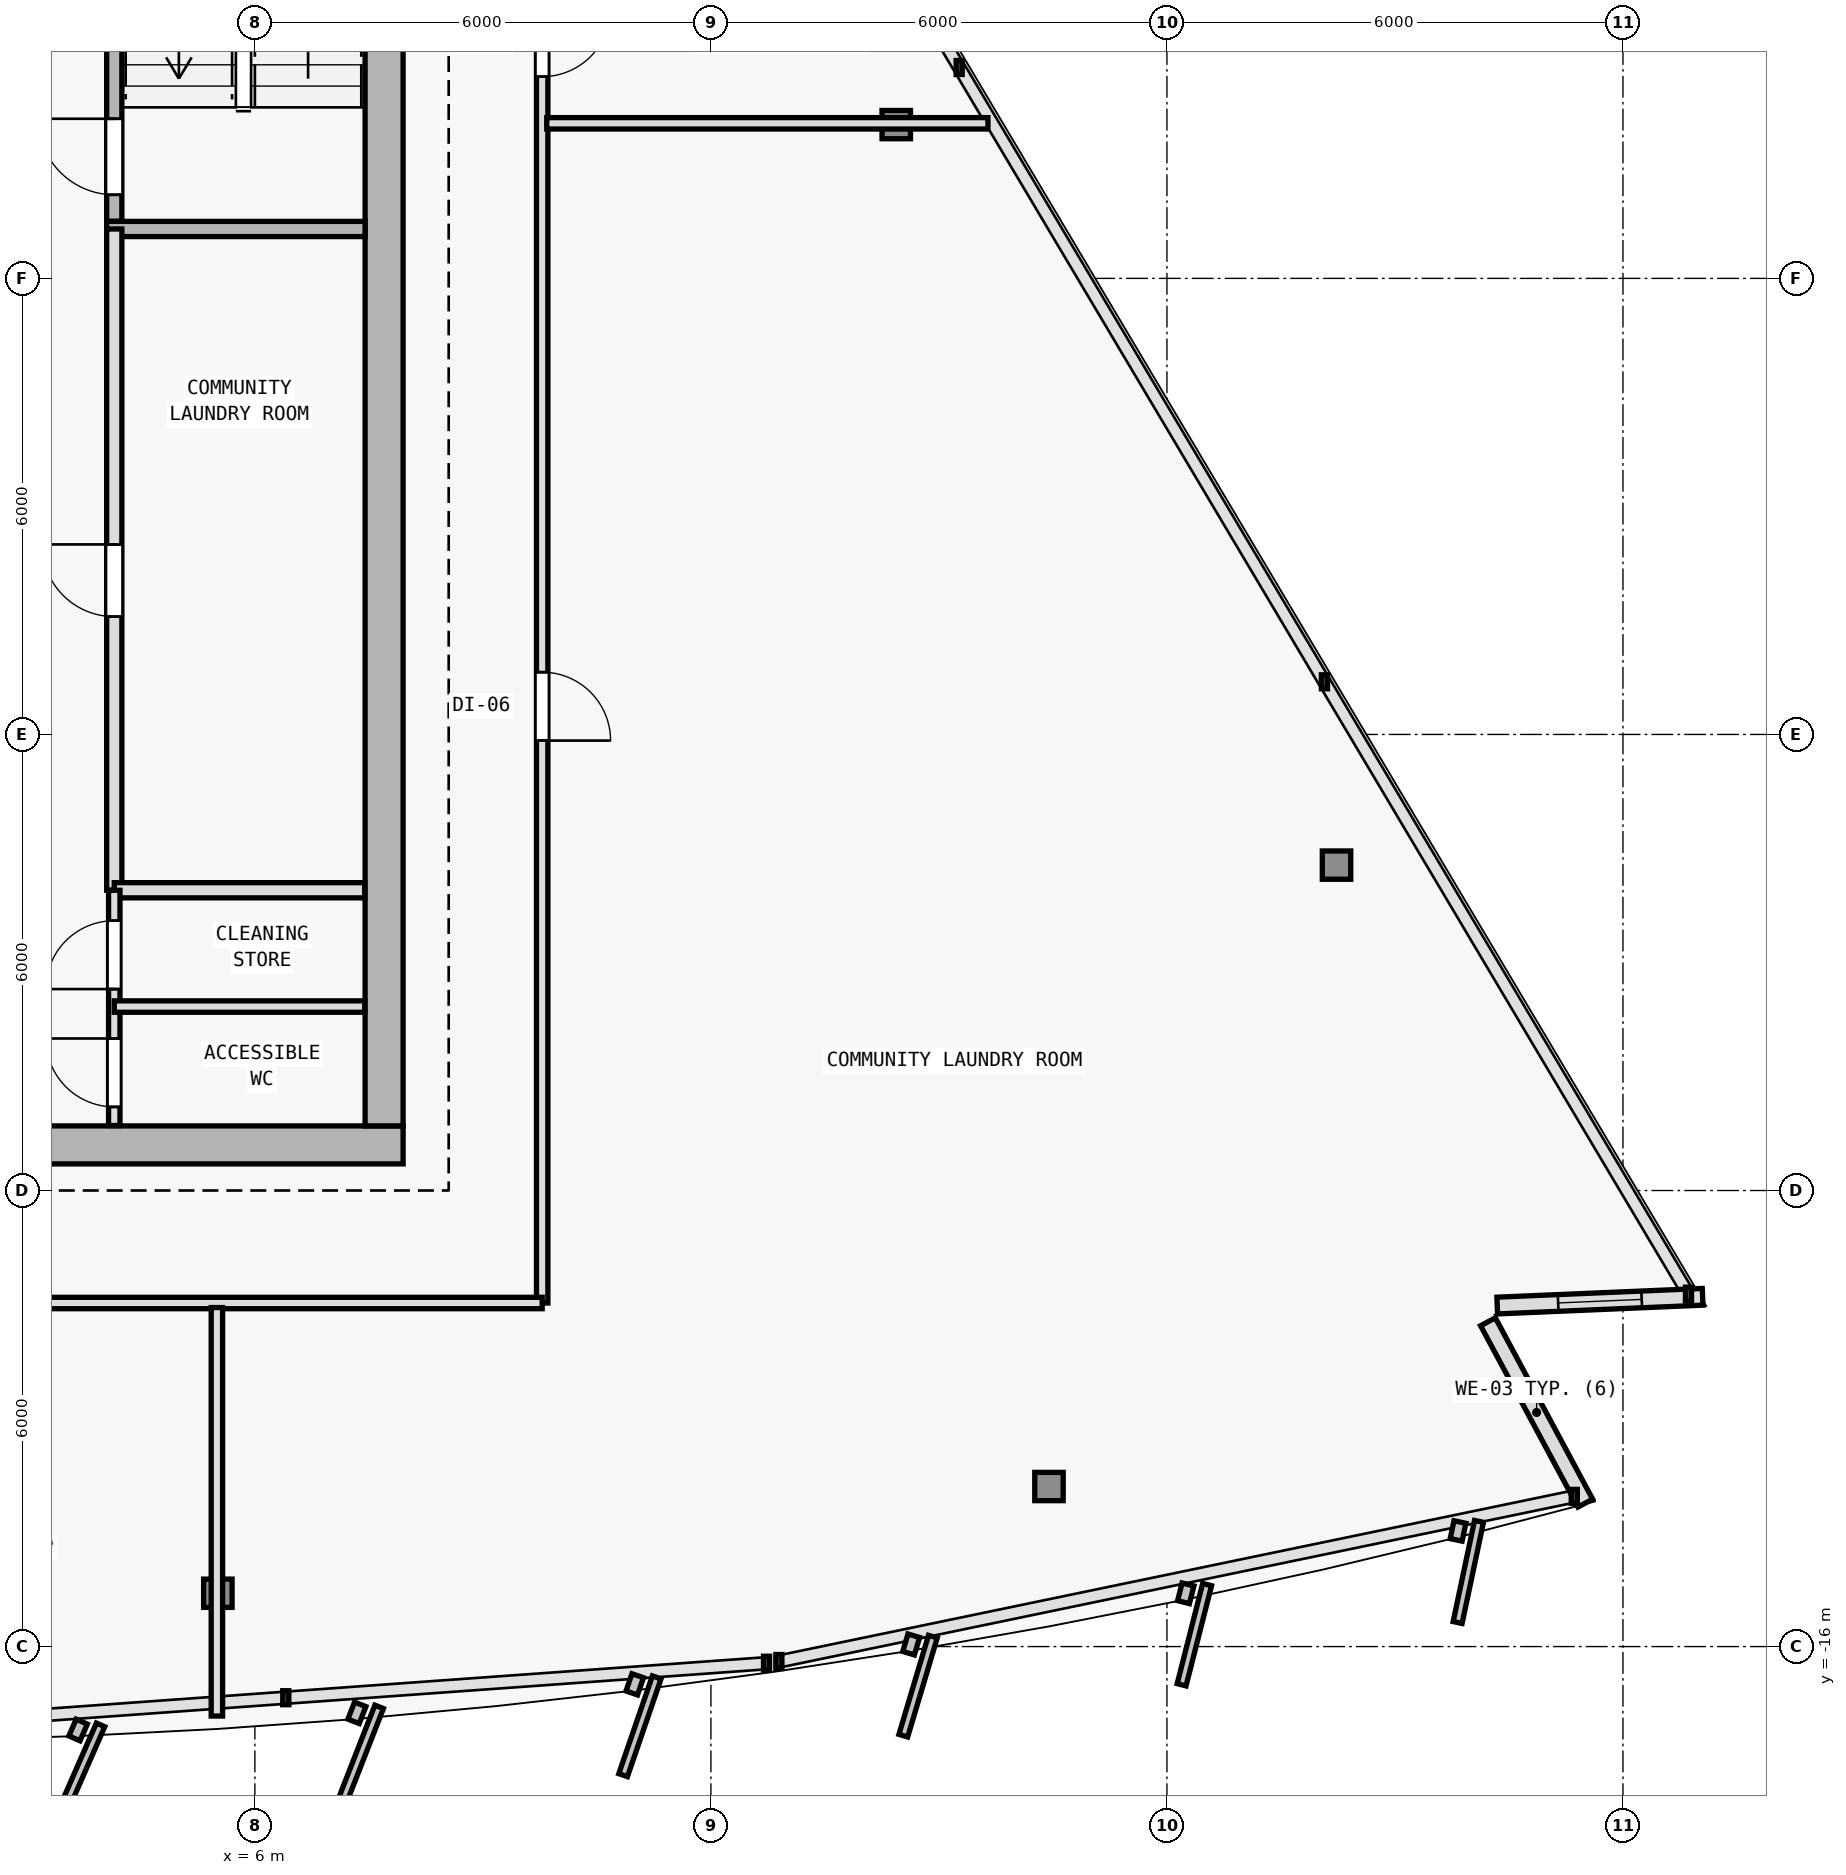
"""IFC4 building model, lengths in metres.
Left out: names, types, materials, properties, quantities, classifications, styles, units other than length and angle.
Written with IfcOpenShell. Run it as: python <this file> out.ifc"""

import sys

from ifc_helpers import new_model, si_unit, direction, frame, frame_2d, origin, origin_2d, place, context, subcontext, project, spatial, rectangle, i_section, extrude, element, fill, save


model = new_model("IFC4")
c1 = context("Model", 3, precision=1e-05, world=origin(), true_north=direction((0.0, 1.0)))
c2 = subcontext(c1, "Body", "Model", "MODEL_VIEW")
j1 = project(units=[si_unit("LENGTHUNIT", "METRE"), si_unit("PLANEANGLEUNIT", "RADIAN")], contexts=[c1])
p1 = place(None, origin())
s1 = spatial("IfcSite", under=j1, at=p1, CompositionType="ELEMENT")
p2 = place(p1, origin())
s2 = spatial("IfcBuilding", under=s1, at=p2, CompositionType="ELEMENT")
p3 = place(p2, frame((0.0, 0.0, 223.5)))
s3 = spatial("IfcBuildingStorey", under=s2, at=p3, CompositionType="ELEMENT", Elevation=223.5)
for number, where, z_axis, x_axis in (
    (1, (7.7, -9.4, 0.0), (0.0, 0.0, 1.0), (1.0, 0.0, 0.0)),
    (2, (7.7, 0.4, 0.0), (0.0, 0.0, 1.0), (1.0, 0.0, 0.0)),
):
    element("IfcColumn", number, at=place(p3, frame(where, z_axis=z_axis, x_axis=x_axis)), inside=s3, PredefinedType="COLUMN", context=c2, shape_type="SweptSolid", body=[
        extrude(i_section(OverallWidth=0.398, OverallDepth=0.387, WebThickness=0.013, FlangeThickness=0.022, FilletRadius=0.015, at=origin_2d()), origin(), (0.0, 0.0, 1.0), 3.6),
    ])
p4 = place(p3, frame((5.513, -15.298, 0.006), z_axis=(-0.006934304776, 0.03521539092, 0.999355688261), x_axis=(-0.981159154887, -0.193201223549, 0.0)))
e3 = element("IfcColumn", 3, at=p4, inside=s3, PredefinedType="COLUMN", context=c2, shape_type="SweptSolid", body=[
    extrude(i_section(OverallWidth=0.374, OverallDepth=0.372, WebThickness=0.012, FlangeThickness=0.02, FilletRadius=0.015, at=origin_2d()), origin(), (0.0, 0.0, 1.0), 3.591),
])
p5 = place(p3, frame((16.448, -13.894, 0.006), z_axis=(-0.020664285442, 0.033443514597, 0.999226960524), x_axis=(-0.850707037426, -0.525640120686, 0.0)))
e4 = element("IfcColumn", 4, at=p5, inside=s3, PredefinedType="COLUMN", context=c2, shape_type="SweptSolid", body=[
    extrude(i_section(OverallWidth=0.374, OverallDepth=0.372, WebThickness=0.012, FlangeThickness=0.02, FilletRadius=0.015, at=origin_2d()), origin(), (0.0, 0.0, 1.0), 3.592),
])
p6 = place(p3, frame((20.231, -5.719, 0.006), z_axis=(-0.026039494941, 0.021620259507, 0.999427090428), x_axis=(-0.638800249892, -0.769372628015, 0.0)))
e5 = element("IfcColumn", 5, at=p6, inside=s3, PredefinedType="COLUMN", context=c2, shape_type="SweptSolid", body=[
    extrude(i_section(OverallWidth=0.374, OverallDepth=0.372, WebThickness=0.012, FlangeThickness=0.02, FilletRadius=0.015, at=origin_2d()), origin(), (0.0, 0.0, 1.0), 3.591),
])
p7 = place(p3, frame((14.438, 4.023, 0.006), z_axis=(-0.018907326549, 0.00952167524, 0.999775900241), x_axis=(-0.449781931574, -0.893138406984, 0.0)))
e6 = element("IfcColumn", 6, at=p7, inside=s3, PredefinedType="COLUMN", context=c2, shape_type="SweptSolid", body=[
    extrude(i_section(OverallWidth=0.374, OverallDepth=0.372, WebThickness=0.012, FlangeThickness=0.02, FilletRadius=0.015, at=origin_2d()), origin(), (0.0, 0.0, 1.0), 3.59),
])
p8 = place(p3, frame((22.224, -11.727, 0.0), z_axis=(0.0, 0.0, 1.0), x_axis=(0.47278184311, -0.881179509989, 0.0)))
e7 = element("IfcWall", 7, at=p8, inside=s3, PredefinedType="SOLIDWALL", context=c2, shape_type="SweptSolid", body=[
    extrude(rectangle(XDim=2.708, YDim=0.22, at=frame_2d((1.354, 0.0))), origin(), (0.0, 0.0, 1.0), 3.35),
])
p9 = place(p3, frame((25.048, -11.398, 0.0), z_axis=(0.0, 0.0, 1.0), x_axis=(-0.999095922254, -0.042512799655, 0.0)))
e8 = element("IfcWall", 8, at=p9, inside=s3, PredefinedType="SOLIDWALL", context=c2, shape_type="SweptSolid", body=[
    extrude(rectangle(XDim=2.705, YDim=0.22, at=frame_2d((1.353, 0.0))), origin(), (0.0, 0.0, 1.0), 3.35),
])
p10 = place(p9, frame((0.802, 0.0, 0.62)))
e9 = element("IfcOpeningElement", 9, at=p10, cuts=e8, PredefinedType="OPENING", context=c2, shape_type="SweptSolid", body=[
    extrude(rectangle(XDim=1.1, YDim=1.8, at=frame_2d((0.55, 0.9))), frame((0.0, 0.12, 0.0), z_axis=(0.0, -1.0, 0.0), x_axis=(1.0, 0.0, 0.0)), (0.0, 0.0, 1.0), 0.24),
])
p11 = place(p3, frame((-7.95, -9.4, 0.0), z_axis=(0.0, 0.0, 1.0), x_axis=(1.0, 0.0, 0.0)))
e10 = element("IfcWall", 10, at=p11, inside=s3, PredefinedType="SHEAR", context=c2, shape_type="SweptSolid", body=[
    extrude(rectangle(XDim=15.9, YDim=0.5, at=frame_2d((7.95, 0.0))), origin(), (0.0, 0.0, 1.0), 3.35),
])
p12 = place(p11, frame((9.6, 0.0, 0.0)))
e11 = element("IfcOpeningElement", 11, at=p12, cuts=e10, PredefinedType="OPENING", context=c2, shape_type="SweptSolid", body=[
    extrude(rectangle(XDim=1.5, YDim=2.2, at=frame_2d((0.75, 1.1))), frame((0.0, 0.26, 0.0), z_axis=(0.0, -1.0, 0.0), x_axis=(1.0, 0.0, 0.0)), (0.0, 0.0, 1.0), 0.52),
])
p13 = place(p3, frame((7.7, 9.95, 0.0), z_axis=(0.0, 0.0, 1.0), x_axis=(0.0, -1.0, 0.0)))
e12 = element("IfcWall", 12, at=p13, inside=s3, PredefinedType="SHEAR", context=c2, shape_type="SweptSolid", body=[
    extrude(rectangle(XDim=19.1, YDim=0.5, at=frame_2d((9.55, 0.0))), origin(), (0.0, 0.0, 1.0), 3.35),
])
p14 = place(p3, frame((4.15, 2.75, 0.0), z_axis=(0.0, 0.0, 1.0), x_axis=(0.0, 1.0, 0.0)))
e13 = element("IfcWall", 13, at=p14, inside=s3, PredefinedType="SOLIDWALL", context=c2, shape_type="SweptSolid", body=[
    extrude(rectangle(XDim=7.2, YDim=0.2, at=frame_2d((3.6, 0.0))), origin(), (0.0, 0.0, 1.0), 3.35),
])
p15 = place(p14, frame((0.35, 0.0, 0.0)))
e14 = element("IfcOpeningElement", 14, at=p15, cuts=e13, PredefinedType="OPENING", context=c2, shape_type="SweptSolid", body=[
    extrude(rectangle(XDim=1.0, YDim=2.15, at=frame_2d((0.5, 1.075))), frame((0.0, 0.11, 0.0), z_axis=(0.0, -1.0, 0.0), x_axis=(1.0, 0.0, 0.0)), (0.0, 0.0, 1.0), 0.22),
])
p16 = place(p3, frame((4.05, 2.65, 0.0), z_axis=(0.0, 0.0, 1.0), x_axis=(1.0, 0.0, 0.0)))
e15 = element("IfcWall", 15, at=p16, inside=s3, PredefinedType="SOLIDWALL", context=c2, shape_type="SweptSolid", body=[
    extrude(rectangle(XDim=3.4, YDim=0.2, at=frame_2d((1.7, 0.0))), origin(), (0.0, 0.0, 1.0), 3.35),
])
p17 = place(p3, frame((4.15, -6.05, 0.0), z_axis=(0.0, 0.0, 1.0), x_axis=(0.0, 1.0, 0.0)))
e16 = element("IfcWall", 16, at=p17, inside=s3, PredefinedType="SOLIDWALL", context=c2, shape_type="SweptSolid", body=[
    extrude(rectangle(XDim=8.7, YDim=0.2, at=frame_2d((4.35, 0.0))), origin(), (0.0, 0.0, 1.0), 3.35),
])
p18 = place(p17, frame((3.6, 0.0, 0.0)))
e17 = element("IfcOpeningElement", 17, at=p18, cuts=e16, PredefinedType="OPENING", context=c2, shape_type="SweptSolid", body=[
    extrude(rectangle(XDim=0.95, YDim=2.1, at=frame_2d((0.475, 1.05))), frame((0.0, 0.11, 0.0), z_axis=(0.0, -1.0, 0.0), x_axis=(1.0, 0.0, 0.0)), (0.0, 0.0, 1.0), 0.22),
])
p19 = place(p3, frame((4.15, -6.05, 0.0), z_axis=(0.0, 0.0, 1.0), x_axis=(1.0, 0.0, 0.0)))
e18 = element("IfcWall", 18, at=p19, inside=s3, PredefinedType="SOLIDWALL", context=c2, shape_type="SweptSolid", body=[
    extrude(rectangle(XDim=3.295, YDim=0.2, at=frame_2d((1.647, 0.0))), origin(), (0.0, 0.0, 1.0), 3.35),
])
p20 = place(p3, frame((4.15, -9.145, 0.0), z_axis=(0.0, 0.0, 1.0), x_axis=(0.0, 1.0, 0.0)))
e19 = element("IfcWall", 19, at=p20, inside=s3, PredefinedType="PARTITIONING", context=c2, shape_type="SweptSolid", body=[
    extrude(rectangle(XDim=3.095, YDim=0.15, at=frame_2d((1.547, 0.0))), origin(), (0.0, 0.0, 1.0), 3.35),
])
p21 = place(p20, frame((0.245, 0.0, 0.0)))
e20 = element("IfcOpeningElement", 20, at=p21, cuts=e19, PredefinedType="OPENING", context=c2, shape_type="SweptSolid", body=[
    extrude(rectangle(XDim=0.9, YDim=2.1, at=frame_2d((0.45, 1.05))), frame((0.0, 0.085, 0.0), z_axis=(0.0, -1.0, 0.0), x_axis=(1.0, 0.0, 0.0)), (0.0, 0.0, 1.0), 0.17),
])
p22 = place(p20, frame((1.795, 0.0, 0.0)))
e21 = element("IfcOpeningElement", 21, at=p22, cuts=e19, PredefinedType="OPENING", context=c2, shape_type="SweptSolid", body=[
    extrude(rectangle(XDim=0.9, YDim=2.1, at=frame_2d((0.45, 1.05))), frame((0.0, 0.085, 0.0), z_axis=(0.0, -1.0, 0.0), x_axis=(1.0, 0.0, 0.0)), (0.0, 0.0, 1.0), 0.17),
])
p23 = place(p3, frame((4.15, -7.58, 0.0), z_axis=(0.0, 0.0, 1.0), x_axis=(1.0, 0.0, 0.0)))
e22 = element("IfcWall", 22, at=p23, inside=s3, PredefinedType="PARTITIONING", context=c2, shape_type="SweptSolid", body=[
    extrude(rectangle(XDim=3.295, YDim=0.15, at=frame_2d((1.647, 0.0))), origin(), (0.0, 0.0, 1.0), 3.35),
])
p24 = place(p3, frame((9.78, 8.226, 0.0), z_axis=(0.0, 0.0, 1.0), x_axis=(0.0, -1.0, 0.0)))
e23 = element("IfcWall", 23, at=p24, inside=s3, PredefinedType="PARTITIONING", context=c2, shape_type="SweptSolid", body=[
    extrude(rectangle(XDim=19.706, YDim=0.15, at=frame_2d((9.853, 0.0))), origin(), (0.0, 0.0, 1.0), 2.775),
])
p25 = place(p24, frame((11.407, 0.0, 0.0)))
e24 = element("IfcOpeningElement", 24, at=p25, cuts=e23, PredefinedType="OPENING", context=c2, shape_type="SweptSolid", body=[
    extrude(rectangle(XDim=0.9, YDim=2.1, at=frame_2d((0.45, 1.05))), frame((0.0, 0.085, 0.0), z_axis=(0.0, -1.0, 0.0), x_axis=(1.0, 0.0, 0.0)), (0.0, 0.0, 1.0), 0.17),
])
p26 = place(p24, frame((2.672, 0.0, 0.0)))
e25 = element("IfcOpeningElement", 25, at=p26, cuts=e23, PredefinedType="OPENING", context=c2, shape_type="SweptSolid", body=[
    extrude(rectangle(XDim=0.9, YDim=2.1, at=frame_2d((0.45, 1.05))), frame((0.0, 0.085, 0.0), z_axis=(0.0, -1.0, 0.0), x_axis=(1.0, 0.0, 0.0)), (0.0, 0.0, 1.0), 0.17),
])
p27 = place(p24, frame((0.668, 0.0, 0.0)))
e26 = element("IfcOpeningElement", 26, at=p27, cuts=e23, PredefinedType="OPENING", context=c2, shape_type="SweptSolid", body=[
    extrude(rectangle(XDim=0.9, YDim=2.1, at=frame_2d((0.45, 1.05))), frame((0.0, 0.085, 0.0), z_axis=(0.0, -1.0, 0.0), x_axis=(1.0, 0.0, 0.0)), (0.0, 0.0, 1.0), 0.17),
])
p28 = place(p3, frame((9.78, -11.48, 0.0), z_axis=(0.0, 0.0, 1.0), x_axis=(-1.0, 0.0, 0.0)))
e27 = element("IfcWall", 27, at=p28, inside=s3, PredefinedType="PARTITIONING", context=c2, shape_type="SweptSolid", body=[
    extrude(rectangle(XDim=19.56, YDim=0.15, at=frame_2d((9.78, 0.0))), origin(), (0.0, 0.0, 1.0), 3.005),
])
p29 = place(p28, frame((12.177, 0.0, 0.0)))
e28 = element("IfcOpeningElement", 28, at=p29, cuts=e27, PredefinedType="OPENING", context=c2, shape_type="SweptSolid", body=[
    extrude(rectangle(XDim=0.9, YDim=2.1, at=frame_2d((0.45, 1.05))), frame((0.0, 0.085, 0.0), z_axis=(0.0, -1.0, 0.0), x_axis=(1.0, 0.0, 0.0)), (0.0, 0.0, 1.0), 0.17),
])
p30 = place(p28, frame((6.677, 0.0, 0.0)))
e29 = element("IfcOpeningElement", 29, at=p30, cuts=e27, PredefinedType="OPENING", context=c2, shape_type="SweptSolid", body=[
    extrude(rectangle(XDim=0.9, YDim=2.1, at=frame_2d((0.45, 1.05))), frame((0.0, 0.085, 0.0), z_axis=(0.0, -1.0, 0.0), x_axis=(1.0, 0.0, 0.0)), (0.0, 0.0, 1.0), 0.17),
])
p31 = place(p3, frame((5.5, -11.54, 0.0), z_axis=(0.0, 0.0, 1.0), x_axis=(0.0, -1.0, 0.0)))
e30 = element("IfcWall", 30, at=p31, inside=s3, PredefinedType="PARTITIONING", context=c2, shape_type="SweptSolid", body=[
    extrude(rectangle(XDim=5.374, YDim=0.15, at=frame_2d((2.687, 0.0))), origin(), (0.0, 0.0, 1.0), 2.725),
])
p32 = place(p3, frame((9.84, 4.04, 0.0), z_axis=(0.0, 0.0, 1.0), x_axis=(1.0, 0.0, 0.0)))
e31 = element("IfcWall", 31, at=p32, inside=s3, PredefinedType="PARTITIONING", context=c2, shape_type="SweptSolid", body=[
    extrude(rectangle(XDim=5.805, YDim=0.15, at=frame_2d((2.902, 0.0))), origin(), (0.0, 0.0, 1.0), 2.875),
])
p33 = place(p10, origin())
e32 = element("IfcWindow", 32, at=p33, inside=s3, PartitioningType="SINGLE_PANEL", PredefinedType="WINDOW", context=c2, shape_type="SweptSolid", body=[
    extrude(rectangle(XDim=1.1, YDim=1.8, at=frame_2d((0.55, 0.9))), frame((0.0, 0.03, 0.0), z_axis=(0.0, -1.0, 0.0), x_axis=(1.0, 0.0, 0.0)), (0.0, 0.0, 1.0), 0.06),
])
fill(e9, e32)
p34 = place(p15, origin())
e33 = element("IfcDoor", 33, at=p34, inside=s3, OperationType="SINGLE_SWING_RIGHT", PredefinedType="DOOR", context=c2, shape_type="SweptSolid", body=[
    extrude(rectangle(XDim=1.0, YDim=2.15, at=frame_2d((0.5, 1.075))), frame((0.0, 0.025, 0.0), z_axis=(0.0, -1.0, 0.0), x_axis=(1.0, 0.0, 0.0)), (0.0, 0.0, 1.0), 0.05),
])
fill(e14, e33)
p35 = place(p18, origin())
e34 = element("IfcDoor", 34, at=p35, inside=s3, OperationType="SINGLE_SWING_RIGHT", PredefinedType="DOOR", context=c2, shape_type="SweptSolid", body=[
    extrude(rectangle(XDim=0.95, YDim=2.1, at=frame_2d((0.475, 1.05))), frame((0.0, 0.025, 0.0), z_axis=(0.0, -1.0, 0.0), x_axis=(1.0, 0.0, 0.0)), (0.0, 0.0, 1.0), 0.05),
])
fill(e17, e34)
p36 = place(p21, origin())
e35 = element("IfcDoor", 35, at=p36, inside=s3, OperationType="SINGLE_SWING_RIGHT", PredefinedType="DOOR", context=c2, shape_type="SweptSolid", body=[
    extrude(rectangle(XDim=0.9, YDim=2.1, at=frame_2d((0.45, 1.05))), frame((0.0, 0.025, 0.0), z_axis=(0.0, -1.0, 0.0), x_axis=(1.0, 0.0, 0.0)), (0.0, 0.0, 1.0), 0.05),
])
fill(e20, e35)
p37 = place(p22, origin())
e36 = element("IfcDoor", 36, at=p37, inside=s3, OperationType="SINGLE_SWING_LEFT", PredefinedType="DOOR", context=c2, shape_type="SweptSolid", body=[
    extrude(rectangle(XDim=0.9, YDim=2.1, at=frame_2d((0.45, 1.05))), frame((0.0, 0.025, 0.0), z_axis=(0.0, -1.0, 0.0), x_axis=(1.0, 0.0, 0.0)), (0.0, 0.0, 1.0), 0.05),
])
fill(e21, e36)
p38 = place(p25, origin())
e37 = element("IfcDoor", 37, at=p38, inside=s3, OperationType="SINGLE_SWING_RIGHT", PredefinedType="DOOR", context=c2, shape_type="SweptSolid", body=[
    extrude(rectangle(XDim=0.9, YDim=2.1, at=frame_2d((0.45, 1.05))), frame((0.0, 0.025, 0.0), z_axis=(0.0, -1.0, 0.0), x_axis=(1.0, 0.0, 0.0)), (0.0, 0.0, 1.0), 0.05),
])
fill(e24, e37)
p39 = place(p26, origin())
e38 = element("IfcDoor", 38, at=p39, inside=s3, OperationType="SINGLE_SWING_LEFT", PredefinedType="DOOR", context=c2, shape_type="SweptSolid", body=[
    extrude(rectangle(XDim=0.9, YDim=2.1, at=frame_2d((0.45, 1.05))), frame((0.0, 0.025, 0.0), z_axis=(0.0, -1.0, 0.0), x_axis=(1.0, 0.0, 0.0)), (0.0, 0.0, 1.0), 0.05),
])
fill(e25, e38)
save(model, sys.argv[1])
